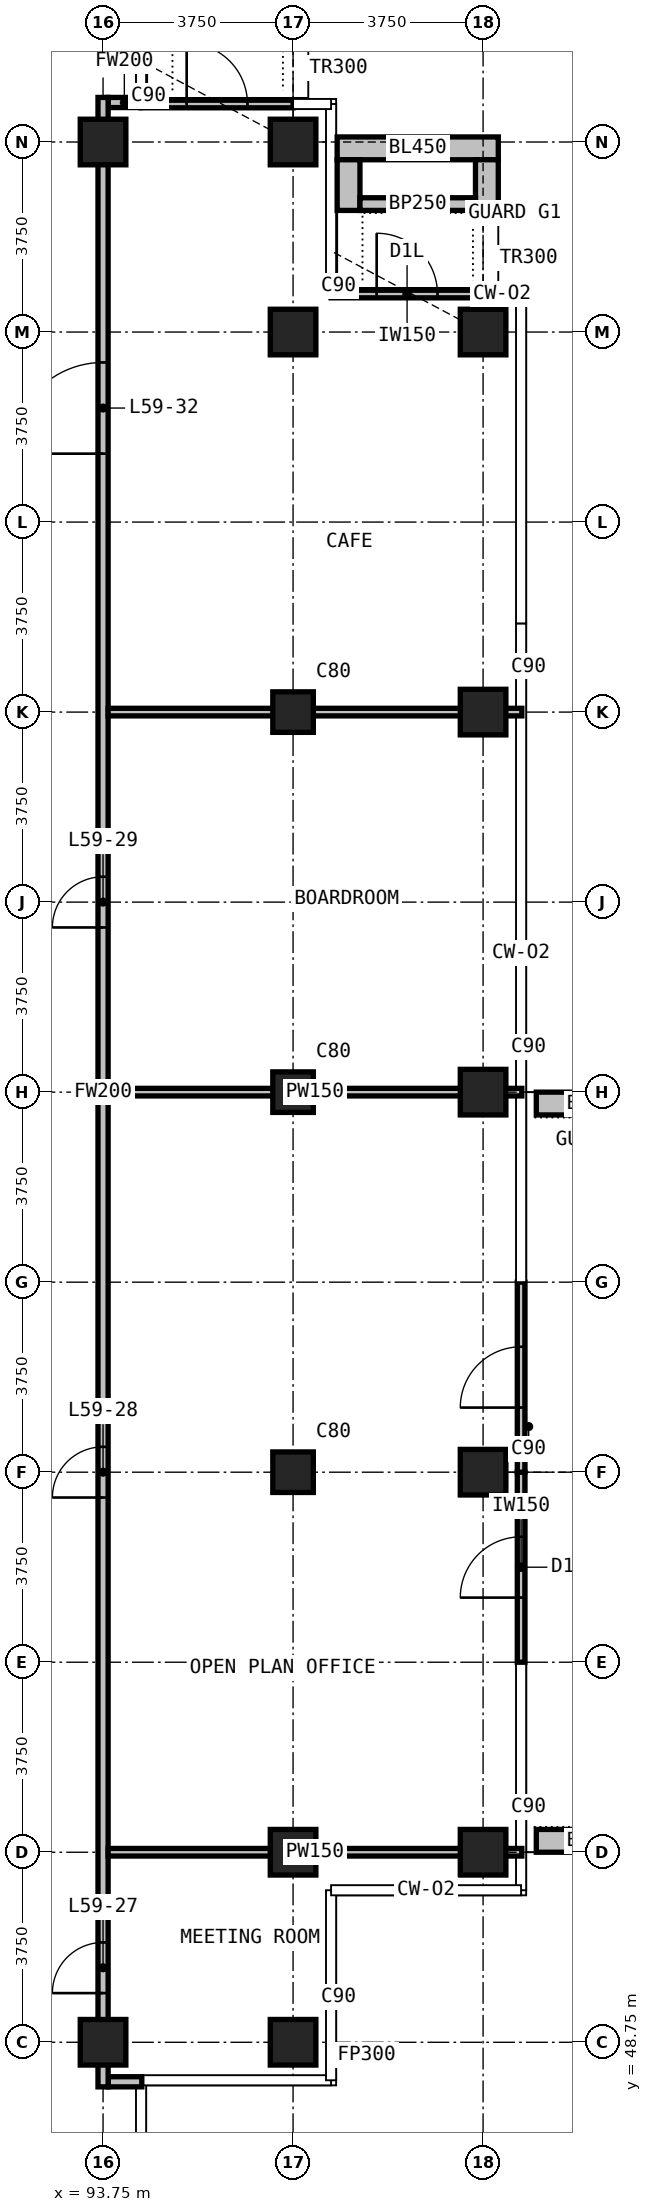
"""IFC4 building model, lengths in metres.
Left out: names, types, materials, properties, quantities, classifications, styles, units other than length and angle.
Written with IfcOpenShell. Run it as: python <this file> out.ifc"""

import sys

from ifc_helpers import new_model, si_unit, direction, frame, frame_2d, origin, origin_2d, place, context, subcontext, project, spatial, rectangle, extrude, element, fill, save


model = new_model("IFC4")
c1 = context("Model", 3, precision=1e-05, world=origin(), true_north=direction((0.0, 1.0)))
c2 = subcontext(c1, "Body", "Model", "MODEL_VIEW")
j1 = project(units=[si_unit("LENGTHUNIT", "METRE"), si_unit("PLANEANGLEUNIT", "RADIAN")], contexts=[c1])
p1 = place(None, origin())
s1 = spatial("IfcSite", under=j1, at=p1, CompositionType="ELEMENT")
p2 = place(p1, origin())
s2 = spatial("IfcBuilding", under=s1, at=p2, CompositionType="ELEMENT")
p3 = place(p2, frame((0.0, 0.0, 228.3)))
s3 = spatial("IfcBuildingStorey", under=s2, at=p3, CompositionType="ELEMENT", Elevation=228.3)
for number, where, z_axis, x_axis in (
    (1, (93.75, 48.75, 0.0), (0.0, 0.0, 1.0), (1.0, 0.0, 0.0)),
    (2, (93.75, 86.25, 0.0), (0.0, 0.0, 1.0), (1.0, 0.0, 0.0)),
    (3, (97.5, 48.75, 0.0), (0.0, 0.0, 1.0), (1.0, 0.0, 0.0)),
    (4, (97.5, 52.5, 0.0), (0.0, 0.0, 1.0), (1.0, 0.0, 0.0)),
):
    element("IfcColumn", number, at=place(p3, frame(where, z_axis=z_axis, x_axis=x_axis)), inside=s3, PredefinedType="COLUMN", context=c2, shape_type="SweptSolid", body=[
        extrude(rectangle(XDim=0.9, YDim=0.9, at=origin_2d()), origin(), (0.0, 0.0, 1.0), 3.6),
    ])
for number, where, z_axis, x_axis in (
    (5, (97.5, 60.0, 0.0), (0.0, 0.0, 1.0), (1.0, 0.0, 0.0)),
    (6, (97.5, 67.5, 0.0), (0.0, 0.0, 1.0), (1.0, 0.0, 0.0)),
    (7, (97.5, 75.0, 0.0), (0.0, 0.0, 1.0), (1.0, 0.0, 0.0)),
):
    element("IfcColumn", number, at=place(p3, frame(where, z_axis=z_axis, x_axis=x_axis)), inside=s3, PredefinedType="COLUMN", context=c2, shape_type="SweptSolid", body=[
        extrude(rectangle(XDim=0.8, YDim=0.8, at=origin_2d()), origin(), (0.0, 0.0, 1.0), 3.6),
    ])
for number, where, z_axis, x_axis in (
    (8, (97.5, 82.5, 0.0), (0.0, 0.0, 1.0), (1.0, 0.0, 0.0)),
    (9, (97.5, 86.25, 0.0), (0.0, 0.0, 1.0), (1.0, 0.0, 0.0)),
    (10, (101.25, 52.5, 0.0), (0.0, 0.0, 1.0), (1.0, 0.0, 0.0)),
    (11, (101.25, 60.0, 0.0), (0.0, 0.0, 1.0), (1.0, 0.0, 0.0)),
    (12, (101.25, 67.5, 0.0), (0.0, 0.0, 1.0), (1.0, 0.0, 0.0)),
    (13, (101.25, 75.0, 0.0), (0.0, 0.0, 1.0), (1.0, 0.0, 0.0)),
    (14, (101.25, 82.5, 0.0), (0.0, 0.0, 1.0), (1.0, 0.0, 0.0)),
):
    element("IfcColumn", number, at=place(p3, frame(where, z_axis=z_axis, x_axis=x_axis)), inside=s3, PredefinedType="COLUMN", context=c2, shape_type="SweptSolid", body=[
        extrude(rectangle(XDim=0.9, YDim=0.9, at=origin_2d()), origin(), (0.0, 0.0, 1.0), 3.6),
    ])
p4 = place(p3, frame((102.0, 56.25, 0.0), z_axis=(0.0, 0.0, 1.0), x_axis=(0.0, 1.0, 0.0)))
e15 = element("IfcWall", 15, at=p4, inside=s3, PredefinedType="SOLIDWALL", context=c2, shape_type="SweptSolid", body=[
    extrude(rectangle(XDim=3.75, YDim=0.15, at=frame_2d((1.875, 0.0))), origin(), (0.0, 0.0, 1.0), 3.3),
])
p5 = place(p4, frame((1.275, 0.0, 0.0)))
e16 = element("IfcOpeningElement", 16, at=p5, cuts=e15, PredefinedType="OPENING", context=c2, shape_type="SweptSolid", body=[
    extrude(rectangle(XDim=1.2, YDim=2.4, at=frame_2d((0.6, 1.2))), frame((0.0, 0.085, 0.0), z_axis=(0.0, -1.0, 0.0), x_axis=(1.0, 0.0, 0.0)), (0.0, 0.0, 1.0), 0.17),
])
p6 = place(p3, frame((102.0, 60.0, 0.0), z_axis=(0.0, 0.0, 1.0), x_axis=(0.0, 1.0, 0.0)))
e17 = element("IfcWall", 17, at=p6, inside=s3, PredefinedType="SOLIDWALL", context=c2, shape_type="SweptSolid", body=[
    extrude(rectangle(XDim=3.75, YDim=0.15, at=frame_2d((1.875, 0.0))), origin(), (0.0, 0.0, 1.0), 3.3),
])
p7 = place(p6, frame((1.275, 0.0, 0.0)))
e18 = element("IfcOpeningElement", 18, at=p7, cuts=e17, PredefinedType="OPENING", context=c2, shape_type="SweptSolid", body=[
    extrude(rectangle(XDim=1.2, YDim=2.4, at=frame_2d((0.6, 1.2))), frame((0.0, 0.085, 0.0), z_axis=(0.0, -1.0, 0.0), x_axis=(1.0, 0.0, 0.0)), (0.0, 0.0, 1.0), 0.17),
])
p8 = place(p3, frame((98.25, 83.25, 0.0), z_axis=(0.0, 0.0, 1.0), x_axis=(1.0, 0.0, 0.0)))
e19 = element("IfcWall", 19, at=p8, inside=s3, PredefinedType="SOLIDWALL", context=c2, shape_type="SweptSolid", body=[
    extrude(rectangle(XDim=3.0, YDim=0.15, at=frame_2d((1.5, 0.0))), origin(), (0.0, 0.0, 1.0), 3.3),
])
p9 = place(p8, frame((0.9, 0.0, 0.0)))
e20 = element("IfcOpeningElement", 20, at=p9, cuts=e19, PredefinedType="OPENING", context=c2, shape_type="SweptSolid", body=[
    extrude(rectangle(XDim=1.2, YDim=2.0, at=frame_2d((0.6, 1.0))), frame((0.0, 0.085, 0.0), z_axis=(0.0, -1.0, 0.0), x_axis=(1.0, 0.0, 0.0)), (0.0, 0.0, 1.0), 0.17),
])
p10 = place(p3, frame((94.5, 87.0, 0.0), z_axis=(0.0, 0.0, 1.0), x_axis=(1.0, 0.0, 0.0)))
e21 = element("IfcWall", 21, at=p10, inside=s3, PredefinedType="SOLIDWALL", context=c2, shape_type="SweptSolid", body=[
    extrude(rectangle(XDim=3.0, YDim=0.15, at=frame_2d((1.5, 0.0))), origin(), (0.0, 0.0, 1.0), 3.3),
])
p11 = place(p10, frame((0.9, 0.0, 0.0)))
e22 = element("IfcOpeningElement", 22, at=p11, cuts=e21, PredefinedType="OPENING", context=c2, shape_type="SweptSolid", body=[
    extrude(rectangle(XDim=1.2, YDim=2.0, at=frame_2d((0.6, 1.0))), frame((0.0, 0.085, 0.0), z_axis=(0.0, -1.0, 0.0), x_axis=(1.0, 0.0, 0.0)), (0.0, 0.0, 1.0), 0.17),
])
for number, where, z_axis, x_axis in (
    (23, (102.3, 52.725, 0.0), (0.0, 0.0, 1.0), (1.0, 0.0, 0.0)),
    (24, (102.3, 67.275, 0.0), (0.0, 0.0, 1.0), (1.0, 0.0, 0.0)),
):
    element("IfcWall", number, at=place(p3, frame(where, z_axis=z_axis, x_axis=x_axis)), inside=s3, PredefinedType="USERDEFINED", context=c2, shape_type="SweptSolid", body=[
        extrude(rectangle(XDim=2.35, YDim=0.45, at=frame_2d((1.175, 0.0))), origin(), (0.0, 0.0, 1.0), 1.1),
    ])
p12 = place(p3, frame((98.37, 86.125, 0.0), z_axis=(0.0, 0.0, 1.0), x_axis=(1.0, 0.0, 0.0)))
e25 = element("IfcWall", 25, at=p12, inside=s3, PredefinedType="USERDEFINED", context=c2, shape_type="SweptSolid", body=[
    extrude(rectangle(XDim=3.18, YDim=0.45, at=frame_2d((1.59, 0.0))), origin(), (0.0, 0.0, 1.0), 1.1),
])
for number, where, z_axis, x_axis in (
    (26, (98.595, 84.9, 0.0), (0.0, 0.0, 1.0), (0.0, 1.0, 0.0)),
    (27, (101.325, 84.9, 0.0), (0.0, 0.0, 1.0), (0.0, 1.0, 0.0)),
):
    element("IfcWall", number, at=place(p3, frame(where, z_axis=z_axis, x_axis=x_axis)), inside=s3, PredefinedType="USERDEFINED", context=c2, shape_type="SweptSolid", body=[
        extrude(rectangle(XDim=1.0, YDim=0.45, at=frame_2d((0.5, 0.0))), origin(), (0.0, 0.0, 1.0), 1.1),
    ])
p13 = place(p3, frame((98.82, 85.025, 0.0), z_axis=(0.0, 0.0, 1.0), x_axis=(1.0, 0.0, 0.0)))
e28 = element("IfcWall", 28, at=p13, inside=s3, PredefinedType="USERDEFINED", context=c2, shape_type="SweptSolid", body=[
    extrude(rectangle(XDim=2.28, YDim=0.25, at=frame_2d((1.14, 0.0))), origin(), (0.0, 0.0, 1.0), 1.0),
])
p14 = place(p3, frame((93.85, 47.97, 0.0), z_axis=(0.0, 0.0, 1.0), x_axis=(1.0, 0.0, 0.0)))
e29 = element("IfcWall", 29, at=p14, inside=s3, PredefinedType="PARTITIONING", context=c2, shape_type="SweptSolid", body=[
    extrude(rectangle(XDim=0.665, YDim=0.2, at=frame_2d((0.333, 0.0))), origin(), (0.0, 0.0, 1.0), 3.3),
])
p15 = place(p3, frame((93.85, 87.03, 0.0), z_axis=(0.0, 0.0, 1.0), x_axis=(1.0, 0.0, 0.0)))
e30 = element("IfcWall", 30, at=p15, inside=s3, PredefinedType="PARTITIONING", context=c2, shape_type="SweptSolid", body=[
    extrude(rectangle(XDim=0.64, YDim=0.2, at=frame_2d((0.32, 0.0))), origin(), (0.0, 0.0, 1.0), 3.3),
])
p16 = place(p3, frame((93.75, 47.87, 0.0), z_axis=(0.0, 0.0, 1.0), x_axis=(0.0, 1.0, 0.0)))
e31 = element("IfcWall", 31, at=p16, inside=s3, PredefinedType="PARTITIONING", context=c2, shape_type="SweptSolid", body=[
    extrude(rectangle(XDim=39.26, YDim=0.2, at=frame_2d((19.63, 0.0))), origin(), (0.0, 0.0, 1.0), 3.3),
])
p17 = place(p16, frame((1.85, 0.0, 0.0)))
e32 = element("IfcOpeningElement", 32, at=p17, cuts=e31, PredefinedType="OPENING", context=c2, shape_type="SweptSolid", body=[
    extrude(rectangle(XDim=1.0, YDim=2.2, at=frame_2d((0.5, 1.1))), frame((0.0, 0.11, 0.0), z_axis=(0.0, -1.0, 0.0), x_axis=(1.0, 0.0, 0.0)), (0.0, 0.0, 1.0), 0.22),
])
p18 = place(p16, frame((11.63, 0.0, 0.0)))
e33 = element("IfcOpeningElement", 33, at=p18, cuts=e31, PredefinedType="OPENING", context=c2, shape_type="SweptSolid", body=[
    extrude(rectangle(XDim=1.0, YDim=2.2, at=frame_2d((0.5, 1.1))), frame((0.0, 0.11, 0.0), z_axis=(0.0, -1.0, 0.0), x_axis=(1.0, 0.0, 0.0)), (0.0, 0.0, 1.0), 0.22),
])
p19 = place(p16, frame((22.88, 0.0, 0.0)))
e34 = element("IfcOpeningElement", 34, at=p19, cuts=e31, PredefinedType="OPENING", context=c2, shape_type="SweptSolid", body=[
    extrude(rectangle(XDim=1.0, YDim=2.2, at=frame_2d((0.5, 1.1))), frame((0.0, 0.11, 0.0), z_axis=(0.0, -1.0, 0.0), x_axis=(1.0, 0.0, 0.0)), (0.0, 0.0, 1.0), 0.22),
])
p20 = place(p16, frame((32.23, 0.0, 0.0)))
e35 = element("IfcOpeningElement", 35, at=p20, cuts=e31, PredefinedType="OPENING", context=c2, shape_type="SweptSolid", body=[
    extrude(rectangle(XDim=1.8, YDim=2.2, at=frame_2d((0.9, 1.1))), frame((0.0, 0.11, 0.0), z_axis=(0.0, -1.0, 0.0), x_axis=(1.0, 0.0, 0.0)), (0.0, 0.0, 1.0), 0.22),
])
for number, where, z_axis, x_axis in (
    (36, (93.85, 52.5, 0.0), (0.0, 0.0, 1.0), (1.0, 0.0, 0.0)),
    (37, (93.85, 67.5, 0.0), (0.0, 0.0, 1.0), (1.0, 0.0, 0.0)),
    (38, (93.85, 75.0, 0.0), (0.0, 0.0, 1.0), (1.0, 0.0, 0.0)),
):
    element("IfcWall", number, at=place(p3, frame(where, z_axis=z_axis, x_axis=x_axis)), inside=s3, PredefinedType="PARTITIONING", context=c2, shape_type="SweptSolid", body=[
        extrude(rectangle(XDim=8.165, YDim=0.15, at=frame_2d((4.083, 0.0))), origin(), (0.0, 0.0, 1.0), 3.3),
    ])
p21 = place(p5, origin())
e39 = element("IfcDoor", 39, at=p21, inside=s3, OperationType="SINGLE_SWING_LEFT", PredefinedType="DOOR", context=c2, shape_type="SweptSolid", body=[
    extrude(rectangle(XDim=1.2, YDim=2.4, at=frame_2d((0.6, 1.2))), frame((0.0, 0.025, 0.0), z_axis=(0.0, -1.0, 0.0), x_axis=(1.0, 0.0, 0.0)), (0.0, 0.0, 1.0), 0.05),
])
fill(e16, e39)
p22 = place(p7, origin())
e40 = element("IfcDoor", 40, at=p22, inside=s3, OperationType="SINGLE_SWING_LEFT", PredefinedType="DOOR", context=c2, shape_type="SweptSolid", body=[
    extrude(rectangle(XDim=1.2, YDim=2.4, at=frame_2d((0.6, 1.2))), frame((0.0, 0.025, 0.0), z_axis=(0.0, -1.0, 0.0), x_axis=(1.0, 0.0, 0.0)), (0.0, 0.0, 1.0), 0.05),
])
fill(e18, e40)
p23 = place(p9, origin())
e41 = element("IfcDoor", 41, at=p23, inside=s3, OperationType="SINGLE_SWING_LEFT", PredefinedType="DOOR", context=c2, shape_type="SweptSolid", body=[
    extrude(rectangle(XDim=1.2, YDim=2.0, at=frame_2d((0.6, 1.0))), frame((0.0, 0.025, 0.0), z_axis=(0.0, -1.0, 0.0), x_axis=(1.0, 0.0, 0.0)), (0.0, 0.0, 1.0), 0.05),
])
fill(e20, e41)
p24 = place(p11, origin())
e42 = element("IfcDoor", 42, at=p24, inside=s3, OperationType="SINGLE_SWING_LEFT", PredefinedType="DOOR", context=c2, shape_type="SweptSolid", body=[
    extrude(rectangle(XDim=1.2, YDim=2.0, at=frame_2d((0.6, 1.0))), frame((0.0, 0.025, 0.0), z_axis=(0.0, -1.0, 0.0), x_axis=(1.0, 0.0, 0.0)), (0.0, 0.0, 1.0), 0.05),
])
fill(e22, e42)
p25 = place(p17, origin())
e43 = element("IfcDoor", 43, at=p25, inside=s3, OperationType="SINGLE_SWING_RIGHT", PredefinedType="DOOR", context=c2, shape_type="SweptSolid", body=[
    extrude(rectangle(XDim=1.0, YDim=2.2, at=frame_2d((0.5, 1.1))), frame((0.0, 0.025, 0.0), z_axis=(0.0, -1.0, 0.0), x_axis=(1.0, 0.0, 0.0)), (0.0, 0.0, 1.0), 0.05),
])
fill(e32, e43)
p26 = place(p18, origin())
e44 = element("IfcDoor", 44, at=p26, inside=s3, OperationType="SINGLE_SWING_LEFT", PredefinedType="DOOR", context=c2, shape_type="SweptSolid", body=[
    extrude(rectangle(XDim=1.0, YDim=2.2, at=frame_2d((0.5, 1.1))), frame((0.0, 0.025, 0.0), z_axis=(0.0, -1.0, 0.0), x_axis=(1.0, 0.0, 0.0)), (0.0, 0.0, 1.0), 0.05),
])
fill(e33, e44)
p27 = place(p19, origin())
e45 = element("IfcDoor", 45, at=p27, inside=s3, OperationType="SINGLE_SWING_LEFT", PredefinedType="DOOR", context=c2, shape_type="SweptSolid", body=[
    extrude(rectangle(XDim=1.0, YDim=2.2, at=frame_2d((0.5, 1.1))), frame((0.0, 0.025, 0.0), z_axis=(0.0, -1.0, 0.0), x_axis=(1.0, 0.0, 0.0)), (0.0, 0.0, 1.0), 0.05),
])
fill(e34, e45)
p28 = place(p20, origin())
e46 = element("IfcDoor", 46, at=p28, inside=s3, OperationType="DOUBLE_DOOR_SINGLE_SWING", PredefinedType="DOOR", context=c2, shape_type="SweptSolid", body=[
    extrude(rectangle(XDim=1.8, YDim=2.2, at=frame_2d((0.9, 1.1))), frame((0.0, 0.025, 0.0), z_axis=(0.0, -1.0, 0.0), x_axis=(1.0, 0.0, 0.0)), (0.0, 0.0, 1.0), 0.05),
])
fill(e35, e46)
save(model, sys.argv[1])
